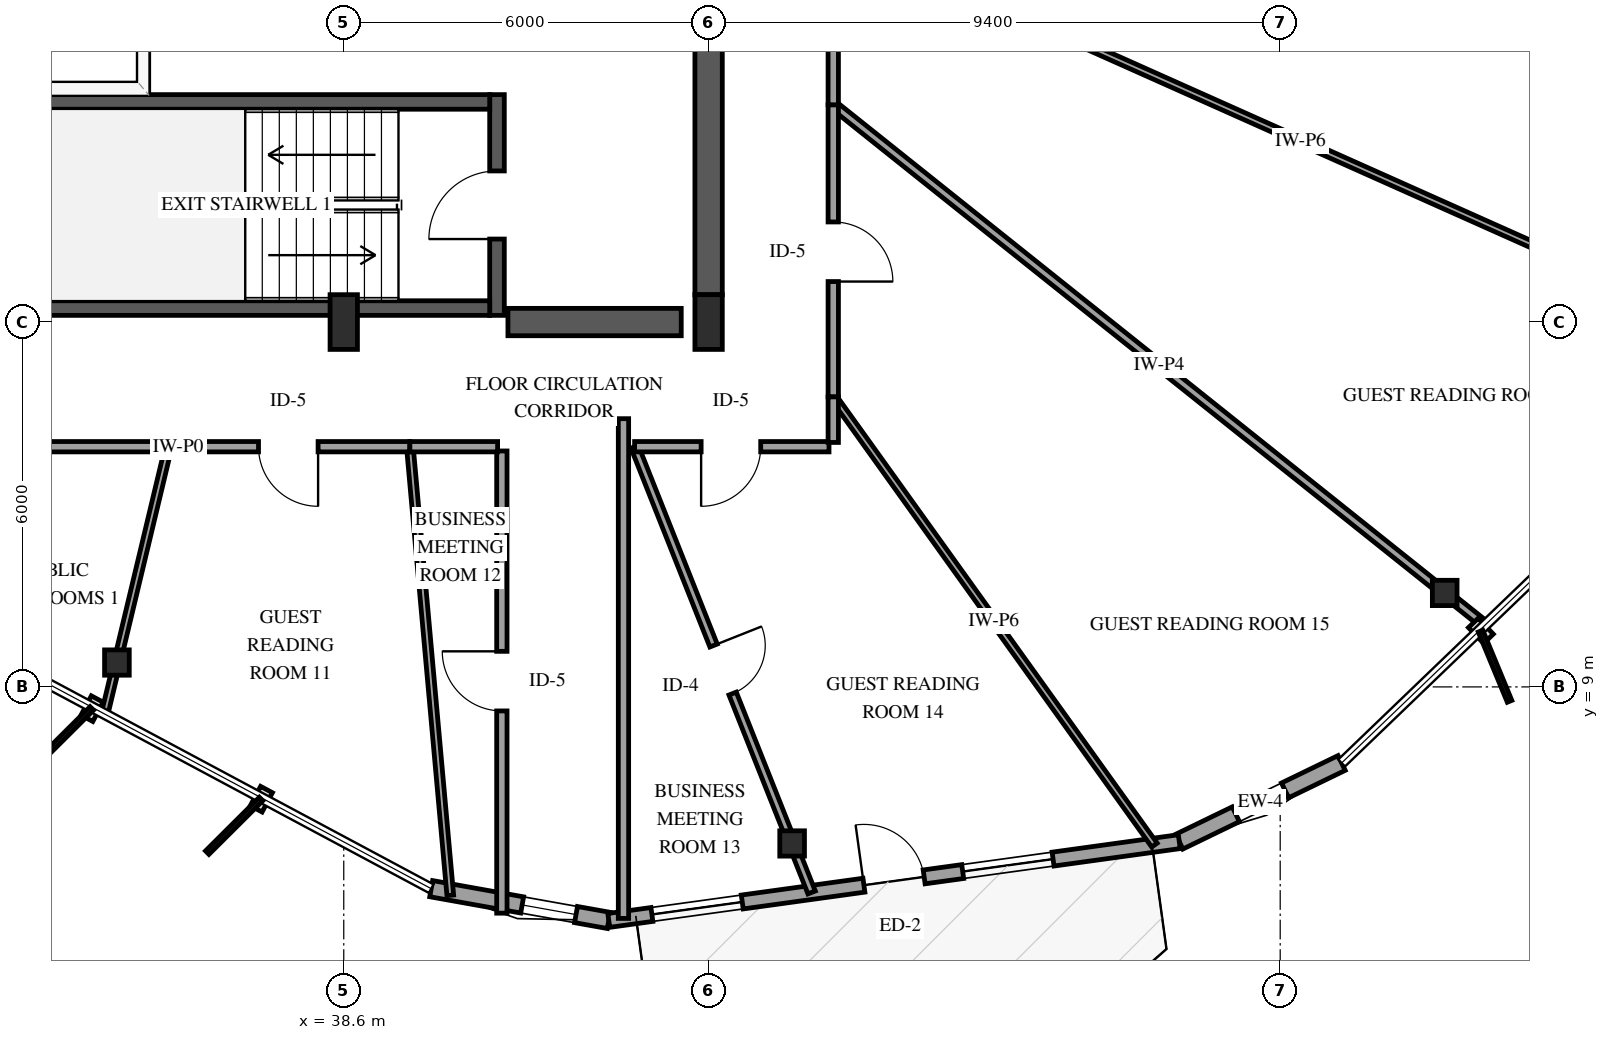
"""IFC4 building model, lengths in metres.
Left out: names, types, materials, properties, quantities, classifications, styles, units other than length and angle.
Written with IfcOpenShell. Run it as: python <this file> out.ifc"""

import sys

from ifc_helpers import new_model, si_unit, direction, frame, frame_2d, origin, origin_2d, place, context, subcontext, project, spatial, rectangle, i_section, extrude, element, fill, save


model = new_model("IFC4")
c1 = context("Model", 3, precision=1e-05, world=origin(), true_north=direction((0.0, 1.0)))
c2 = subcontext(c1, "Body", "Model", "MODEL_VIEW")
j1 = project(units=[si_unit("LENGTHUNIT", "METRE"), si_unit("PLANEANGLEUNIT", "RADIAN")], contexts=[c1])
p1 = place(None, origin())
s1 = spatial("IfcSite", under=j1, at=p1, CompositionType="ELEMENT")
p2 = place(p1, origin())
s2 = spatial("IfcBuilding", under=s1, at=p2, CompositionType="ELEMENT")
p3 = place(p2, frame((0.0, 0.0, 194.2)))
s3 = spatial("IfcBuildingStorey", under=s2, at=p3, CompositionType="ELEMENT", Elevation=194.2)
p4 = place(p3, frame((41.12, 15.11, 0.0), z_axis=(0.0, 0.0, 1.0), x_axis=(0.0, 1.0, 0.0)))
e1 = element("IfcWall", 1, at=p4, inside=s3, PredefinedType="SHEAR", context=c2, shape_type="SweptSolid", body=[
    extrude(rectangle(XDim=3.63, YDim=0.24, at=frame_2d((1.815, 0.0))), origin(), (0.0, 0.0, 1.0), 3.6),
])
p5 = place(p4, frame((1.255, 0.0, 0.0)))
e2 = element("IfcOpeningElement", 2, at=p5, cuts=e1, PredefinedType="OPENING", context=c2, shape_type="SweptSolid", body=[
    extrude(rectangle(XDim=1.12, YDim=2.15, at=frame_2d((0.56, 1.075))), frame((0.0, 0.13, 0.0), z_axis=(0.0, -1.0, 0.0), x_axis=(1.0, 0.0, 0.0)), (0.0, 0.0, 1.0), 0.26),
])
for number, where, z_axis, x_axis in (
    (3, (33.0, 15.23, 0.0), (0.0, 0.0, 1.0), (1.0, 0.0, 0.0)),
    (4, (33.0, 18.62, 0.0), (0.0, 0.0, 1.0), (1.0, 0.0, 0.0)),
):
    element("IfcWall", number, at=place(p3, frame(where, z_axis=z_axis, x_axis=x_axis)), inside=s3, PredefinedType="SHEAR", context=c2, shape_type="SweptSolid", body=[
        extrude(rectangle(XDim=8.0, YDim=0.24, at=frame_2d((4.0, 0.0))), origin(), (0.0, 0.0, 1.0), 3.6),
    ])
p6 = place(p3, frame((41.3, 15.0, 0.0), z_axis=(0.0, 0.0, 1.0), x_axis=(1.0, 0.0, 0.0)))
e5 = element("IfcWall", 5, at=p6, inside=s3, PredefinedType="SHEAR", context=c2, shape_type="SweptSolid", body=[
    extrude(rectangle(XDim=2.85, YDim=0.45, at=frame_2d((1.425, 0.0))), origin(), (0.0, 0.0, 1.0), 3.6),
])
p7 = place(p3, frame((44.6, 15.45, 0.0), z_axis=(0.0, 0.0, 1.0), x_axis=(0.0, 1.0, 0.0)))
e6 = element("IfcWall", 6, at=p7, inside=s3, PredefinedType="SHEAR", context=c2, shape_type="SweptSolid", body=[
    extrude(rectangle(XDim=6.35, YDim=0.45, at=frame_2d((3.175, 0.0))), origin(), (0.0, 0.0, 1.0), 3.6),
])
for number, where, z_axis, x_axis in (
    (7, (38.6, 15.0, 0.0), (0.0, 0.0, 1.0), (1.0, 0.0, 0.0)),
    (8, (44.6, 15.0, 0.0), (0.0, 0.0, 1.0), (1.0, 0.0, 0.0)),
):
    element("IfcColumn", number, at=place(p3, frame(where, z_axis=z_axis, x_axis=x_axis)), inside=s3, PredefinedType="PILASTER", context=c2, shape_type="SweptSolid", body=[
        extrude(rectangle(XDim=0.45, YDim=0.9, at=origin_2d()), origin(), (0.0, 0.0, 1.0), 3.6),
    ])
for number, where, z_axis, x_axis in (
    (9, (34.87, 9.401, 0.0), (0.0, 0.0, 1.0), (1.0, 0.0, 0.0)),
    (10, (45.973, 6.426, 0.0), (0.0, 0.0, 1.0), (1.0, 0.0, 0.0)),
    (11, (56.705, 10.545, 0.0), (0.0, 0.0, 1.0), (1.0, 0.0, 0.0)),
):
    element("IfcColumn", number, at=place(p3, frame(where, z_axis=z_axis, x_axis=x_axis)), inside=s3, PredefinedType="COLUMN", context=c2, shape_type="SweptSolid", body=[
        extrude(i_section(OverallWidth=0.406, OverallDepth=0.416, WebThickness=0.03, FlangeThickness=0.048, FilletRadius=0.038, at=origin_2d()), origin(), (0.0, 0.0, 1.0), 3.6),
    ])
p8 = place(p3, frame((40.038, 5.682, 0.0), z_axis=(0.0, 0.0, 1.0), x_axis=(0.984385841961, -0.176024186253, 0.0)))
e12 = element("IfcWall", 12, at=p8, inside=s3, PredefinedType="SOLIDWALL", context=c2, shape_type="SweptSolid", body=[
    extrude(rectangle(XDim=2.967, YDim=0.27, at=frame_2d((1.483, 0.0))), origin(), (0.0, 0.0, 1.0), 2.679),
])
p9 = place(p8, frame((1.519, 0.0, 0.75)))
e13 = element("IfcOpeningElement", 13, at=p9, cuts=e12, PredefinedType="OPENING", context=c2, shape_type="SweptSolid", body=[
    extrude(rectangle(XDim=0.9, YDim=1.5, at=frame_2d((0.45, 0.75))), frame((0.0, 0.145, 0.0), z_axis=(0.0, -1.0, 0.0), x_axis=(1.0, 0.0, 0.0)), (0.0, 0.0, 1.0), 0.29),
])
p10 = place(p3, frame((52.341, 6.455, 0.0), z_axis=(0.0, 0.0, 1.0), x_axis=(0.899889481121, 0.436118013578, 0.0)))
e14 = element("IfcWall", 14, at=p10, inside=s3, PredefinedType="SOLIDWALL", context=c2, shape_type="SweptSolid", body=[
    extrude(rectangle(XDim=2.966, YDim=0.27, at=frame_2d((1.483, 0.0))), origin(), (0.0, 0.0, 1.0), 2.679),
])
p11 = place(p10, frame((1.033, 0.0, 0.75)))
e15 = element("IfcOpeningElement", 15, at=p11, cuts=e14, PredefinedType="OPENING", context=c2, shape_type="SweptSolid", body=[
    extrude(rectangle(XDim=0.9, YDim=1.5, at=frame_2d((0.45, 0.75))), frame((0.0, 0.145, 0.0), z_axis=(0.0, -1.0, 0.0), x_axis=(1.0, 0.0, 0.0)), (0.0, 0.0, 1.0), 0.29),
])
p12 = place(p3, frame((42.958, 5.16, 0.0), z_axis=(0.0, 0.0, 1.0), x_axis=(0.990605602179, 0.136749921142, 0.0)))
e16 = element("IfcWall", 16, at=p12, inside=s3, PredefinedType="SOLIDWALL", context=c2, shape_type="SweptSolid", body=[
    extrude(rectangle(XDim=9.471, YDim=0.23, at=frame_2d((4.735, 0.0))), origin(), (0.0, 0.0, 1.0), 2.679),
])
p13 = place(p12, frame((4.236, 0.0, 0.0)))
e17 = element("IfcOpeningElement", 17, at=p13, cuts=e16, PredefinedType="OPENING", context=c2, shape_type="SweptSolid", body=[
    extrude(rectangle(XDim=1.0, YDim=2.15, at=frame_2d((0.5, 1.075))), frame((0.0, 0.125, 0.0), z_axis=(0.0, -1.0, 0.0), x_axis=(1.0, 0.0, 0.0)), (0.0, 0.0, 1.0), 0.25),
])
p14 = place(p12, frame((0.716, 0.0, 0.72)))
e18 = element("IfcOpeningElement", 18, at=p14, cuts=e16, PredefinedType="OPENING", context=c2, shape_type="SweptSolid", body=[
    extrude(rectangle(XDim=1.5, YDim=1.7, at=frame_2d((0.75, 0.85))), frame((0.0, 0.125, 0.0), z_axis=(0.0, -1.0, 0.0), x_axis=(1.0, 0.0, 0.0)), (0.0, 0.0, 1.0), 0.25),
])
p15 = place(p12, frame((5.875, 0.0, 0.72)))
e19 = element("IfcOpeningElement", 19, at=p15, cuts=e16, PredefinedType="OPENING", context=c2, shape_type="SweptSolid", body=[
    extrude(rectangle(XDim=1.5, YDim=1.7, at=frame_2d((0.75, 0.85))), frame((0.0, 0.125, 0.0), z_axis=(0.0, -1.0, 0.0), x_axis=(1.0, 0.0, 0.0)), (0.0, 0.0, 1.0), 0.25),
])
p16 = place(p3, frame((35.3, 18.79, 0.0), z_axis=(0.0, 0.0, 1.0), x_axis=(0.0, 1.0, 0.0)))
e20 = element("IfcWall", 20, at=p16, inside=s3, PredefinedType="SOLIDWALL", context=c2, shape_type="SweptSolid", body=[
    extrude(rectangle(XDim=2.55, YDim=0.185, at=frame_2d((1.275, 0.0))), origin(), (0.0, 0.0, 1.0), 3.3),
])
p17 = place(p16, frame((0.725, 0.0, 0.0)))
e21 = element("IfcOpeningElement", 21, at=p17, cuts=e20, PredefinedType="OPENING", context=c2, shape_type="SweptSolid", body=[
    extrude(rectangle(XDim=1.1, YDim=2.15, at=frame_2d((0.55, 1.075))), frame((0.0, 0.103, 0.0), z_axis=(0.0, -1.0, 0.0), x_axis=(1.0, 0.0, 0.0)), (0.0, 0.0, 1.0), 0.205),
])
p18 = place(p3, frame((46.65, 21.405, 0.0), z_axis=(0.0, 0.0, 1.0), x_axis=(0.913078369875, -0.407784122381, 0.0)))
e22 = element("IfcWall", 22, at=p18, inside=s3, PredefinedType="PARTITIONING", context=c2, shape_type="SweptSolid", body=[
    extrude(rectangle(XDim=16.828, YDim=0.11, at=frame_2d((8.414, 0.0))), origin(), (0.0, 0.0, 1.0), 3.3),
])
p19 = place(p3, frame((46.65, 18.573, 0.0), z_axis=(0.0, 0.0, 1.0), x_axis=(0.781519613494, -0.623880672665, 0.0)))
e23 = element("IfcWall", 23, at=p19, inside=s3, PredefinedType="PARTITIONING", context=c2, shape_type="SweptSolid", body=[
    extrude(rectangle(XDim=13.716, YDim=0.14, at=frame_2d((6.858, 0.0))), origin(), (0.0, 0.0, 1.0), 3.3),
])
p20 = place(p3, frame((46.65, 13.769, 0.0), z_axis=(0.0, 0.0, 1.0), x_axis=(0.582523685051, -0.812813727956, 0.0)))
e24 = element("IfcWall", 24, at=p20, inside=s3, PredefinedType="PARTITIONING", context=c2, shape_type="SweptSolid", body=[
    extrude(rectangle(XDim=9.067, YDim=0.11, at=frame_2d((4.534, 0.0))), origin(), (0.0, 0.0, 1.0), 2.678),
])
p21 = place(p3, frame((43.383, 12.95, 0.0), z_axis=(0.0, 0.0, 1.0), x_axis=(0.369089180525, -0.929393983636, 0.0)))
e25 = element("IfcWall", 25, at=p21, inside=s3, PredefinedType="PARTITIONING", context=c2, shape_type="SweptSolid", body=[
    extrude(rectangle(XDim=7.887, YDim=0.13, at=frame_2d((3.943, 0.0))), origin(), (0.0, 0.0, 1.0), 2.595),
])
p22 = place(p21, frame((3.518, 0.0, 0.0)))
e26 = element("IfcOpeningElement", 26, at=p22, cuts=e25, PredefinedType="OPENING", context=c2, shape_type="SweptSolid", body=[
    extrude(rectangle(XDim=0.85, YDim=2.1, at=frame_2d((0.425, 1.05))), frame((0.0, 0.075, 0.0), z_axis=(0.0, -1.0, 0.0), x_axis=(1.0, 0.0, 0.0)), (0.0, 0.0, 1.0), 0.15),
])
p23 = place(p3, frame((41.2, 5.279, 0.0), z_axis=(0.0, 0.0, 1.0), x_axis=(0.0, 1.0, 0.0)))
e27 = element("IfcWall", 27, at=p23, inside=s3, PredefinedType="PARTITIONING", context=c2, shape_type="SweptSolid", body=[
    extrude(rectangle(XDim=7.601, YDim=0.17, at=frame_2d((3.8, 0.0))), origin(), (0.0, 0.0, 1.0), 3.3),
])
p24 = place(p23, frame((3.326, 0.0, 0.0)))
e28 = element("IfcOpeningElement", 28, at=p24, cuts=e27, PredefinedType="OPENING", context=c2, shape_type="SweptSolid", body=[
    extrude(rectangle(XDim=0.98, YDim=2.15, at=frame_2d((0.49, 1.075))), frame((0.0, 0.095, 0.0), z_axis=(0.0, -1.0, 0.0), x_axis=(1.0, 0.0, 0.0)), (0.0, 0.0, 1.0), 0.19),
])
p25 = place(p3, frame((39.687, 12.95, 0.0), z_axis=(0.0, 0.0, 1.0), x_axis=(0.089786794698, -0.995961009025, 0.0)))
e29 = element("IfcWall", 29, at=p25, inside=s3, PredefinedType="PARTITIONING", context=c2, shape_type="SweptSolid", body=[
    extrude(rectangle(XDim=7.407, YDim=0.11, at=frame_2d((3.704, 0.0))), origin(), (0.0, 0.0, 1.0), 2.678),
])
p26 = place(p3, frame((35.719, 12.95, 0.0), z_axis=(0.0, 0.0, 1.0), x_axis=(-1.0, 0.0, 0.0)))
e30 = element("IfcWall", 30, at=p26, inside=s3, PredefinedType="PARTITIONING", context=c2, shape_type="SweptSolid", body=[
    extrude(rectangle(XDim=5.099, YDim=0.17, at=frame_2d((2.549, 0.0))), origin(), (0.0, 0.0, 1.0), 3.3),
])
p27 = place(p26, frame((2.075, 0.0, 0.0)))
e31 = element("IfcOpeningElement", 31, at=p27, cuts=e30, PredefinedType="OPENING", context=c2, shape_type="SweptSolid", body=[
    extrude(rectangle(XDim=0.98, YDim=2.15, at=frame_2d((0.49, 1.075))), frame((0.0, 0.095, 0.0), z_axis=(0.0, -1.0, 0.0), x_axis=(1.0, 0.0, 0.0)), (0.0, 0.0, 1.0), 0.19),
])
p28 = place(p3, frame((46.65, 18.573, 0.0), z_axis=(0.0, 0.0, 1.0), x_axis=(0.0, -1.0, 0.0)))
e32 = element("IfcWall", 32, at=p28, inside=s3, PredefinedType="PARTITIONING", context=c2, shape_type="SweptSolid", body=[
    extrude(rectangle(XDim=4.804, YDim=0.17, at=frame_2d((2.402, 0.0))), origin(), (0.0, 0.0, 1.0), 3.3),
])
p29 = place(p28, frame((1.927, 0.0, 0.0)))
e33 = element("IfcOpeningElement", 33, at=p29, cuts=e32, PredefinedType="OPENING", context=c2, shape_type="SweptSolid", body=[
    extrude(rectangle(XDim=0.98, YDim=2.15, at=frame_2d((0.49, 1.075))), frame((0.0, 0.095, 0.0), z_axis=(0.0, -1.0, 0.0), x_axis=(1.0, 0.0, 0.0)), (0.0, 0.0, 1.0), 0.19),
])
p30 = place(p3, frame((35.719, 12.95, 0.0), z_axis=(0.0, 0.0, 1.0), x_axis=(-0.232786499533, -0.972527863681, 0.0)))
e34 = element("IfcWall", 34, at=p30, inside=s3, PredefinedType="PARTITIONING", context=c2, shape_type="SweptSolid", body=[
    extrude(rectangle(XDim=4.519, YDim=0.11, at=frame_2d((2.26, 0.0))), origin(), (0.0, 0.0, 1.0), 2.595),
])
p31 = place(p3, frame((39.687, 12.95, 0.0), z_axis=(0.0, 0.0, 1.0), x_axis=(-1.0, 0.0, 0.0)))
e35 = element("IfcWall", 35, at=p31, inside=s3, PredefinedType="PARTITIONING", context=c2, shape_type="SweptSolid", body=[
    extrude(rectangle(XDim=3.968, YDim=0.17, at=frame_2d((1.984, 0.0))), origin(), (0.0, 0.0, 1.0), 3.3),
])
p32 = place(p31, frame((1.509, 0.0, 0.0)))
e36 = element("IfcOpeningElement", 36, at=p32, cuts=e35, PredefinedType="OPENING", context=c2, shape_type="SweptSolid", body=[
    extrude(rectangle(XDim=0.98, YDim=2.15, at=frame_2d((0.49, 1.075))), frame((0.0, 0.095, 0.0), z_axis=(0.0, -1.0, 0.0), x_axis=(1.0, 0.0, 0.0)), (0.0, 0.0, 1.0), 0.19),
])
p33 = place(p3, frame((46.58, 12.95, 0.0), z_axis=(0.0, 0.0, 1.0), x_axis=(-1.0, 0.0, 0.0)))
e37 = element("IfcWall", 37, at=p33, inside=s3, PredefinedType="PARTITIONING", context=c2, shape_type="SweptSolid", body=[
    extrude(rectangle(XDim=3.197, YDim=0.17, at=frame_2d((1.599, 0.0))), origin(), (0.0, 0.0, 1.0), 3.3),
])
p34 = place(p33, frame((1.123, 0.0, 0.0)))
e38 = element("IfcOpeningElement", 38, at=p34, cuts=e37, PredefinedType="OPENING", context=c2, shape_type="SweptSolid", body=[
    extrude(rectangle(XDim=0.98, YDim=2.15, at=frame_2d((0.49, 1.075))), frame((0.0, 0.095, 0.0), z_axis=(0.0, -1.0, 0.0), x_axis=(1.0, 0.0, 0.0)), (0.0, 0.0, 1.0), 0.19),
])
p35 = place(p3, frame((46.65, 21.405, 0.0), z_axis=(0.0, 0.0, 1.0), x_axis=(0.0, -1.0, 0.0)))
e39 = element("IfcWall", 39, at=p35, inside=s3, PredefinedType="PARTITIONING", context=c2, shape_type="SweptSolid", body=[
    extrude(rectangle(XDim=2.832, YDim=0.17, at=frame_2d((1.416, 0.0))), origin(), (0.0, 0.0, 1.0), 3.3),
])
p36 = place(p35, frame((0.941, 0.0, 0.0)))
e40 = element("IfcOpeningElement", 40, at=p36, cuts=e39, PredefinedType="OPENING", context=c2, shape_type="SweptSolid", body=[
    extrude(rectangle(XDim=0.98, YDim=2.15, at=frame_2d((0.49, 1.075))), frame((0.0, 0.095, 0.0), z_axis=(0.0, -1.0, 0.0), x_axis=(1.0, 0.0, 0.0)), (0.0, 0.0, 1.0), 0.19),
])
p37 = place(p3, frame((41.13, 12.95, 0.0), z_axis=(0.0, 0.0, 1.0), x_axis=(-1.0, 0.0, 0.0)))
e41 = element("IfcWall", 41, at=p37, inside=s3, PredefinedType="PARTITIONING", context=c2, shape_type="SweptSolid", body=[
    extrude(rectangle(XDim=1.443, YDim=0.17, at=frame_2d((0.721, 0.0))), origin(), (0.0, 0.0, 1.0), 3.3),
])
p38 = place(p3, frame((46.65, 13.769, 0.0), z_axis=(0.0, 0.0, 1.0), x_axis=(0.0, -1.0, 0.0)))
e42 = element("IfcWall", 42, at=p38, inside=s3, PredefinedType="PARTITIONING", context=c2, shape_type="SweptSolid", body=[
    extrude(rectangle(XDim=0.749, YDim=0.17, at=frame_2d((0.375, 0.0))), origin(), (0.0, 0.0, 1.0), 3.3),
])
p39 = place(p3, frame((43.2, 13.411, 0.0), z_axis=(0.0, 0.0, 1.0), x_axis=(0.0, -1.0, 0.0)))
e43 = element("IfcWall", 43, at=p39, inside=s3, PredefinedType="PARTITIONING", context=c2, shape_type="SweptSolid", body=[
    extrude(rectangle(XDim=8.218, YDim=0.17, at=frame_2d((4.109, 0.0))), origin(), (0.0, 0.0, 1.0), 3.3),
])
p40 = place(p9, origin())
e44 = element("IfcWindow", 44, at=p40, inside=s3, PartitioningType="SINGLE_PANEL", PredefinedType="WINDOW", context=c2, shape_type="SweptSolid", body=[
    extrude(rectangle(XDim=0.9, YDim=1.5, at=frame_2d((0.45, 0.75))), frame((0.0, 0.03, 0.0), z_axis=(0.0, -1.0, 0.0), x_axis=(1.0, 0.0, 0.0)), (0.0, 0.0, 1.0), 0.06),
])
fill(e13, e44)
p41 = place(p11, origin())
e45 = element("IfcWindow", 45, at=p41, inside=s3, PartitioningType="SINGLE_PANEL", PredefinedType="WINDOW", context=c2, shape_type="SweptSolid", body=[
    extrude(rectangle(XDim=0.9, YDim=1.5, at=frame_2d((0.45, 0.75))), frame((0.0, 0.03, 0.0), z_axis=(0.0, -1.0, 0.0), x_axis=(1.0, 0.0, 0.0)), (0.0, 0.0, 1.0), 0.06),
])
fill(e15, e45)
p42 = place(p13, origin())
e46 = element("IfcDoor", 46, at=p42, inside=s3, OperationType="SINGLE_SWING_LEFT", PredefinedType="DOOR", context=c2, shape_type="SweptSolid", body=[
    extrude(rectangle(XDim=1.0, YDim=2.15, at=frame_2d((0.5, 1.075))), frame((0.0, 0.025, 0.0), z_axis=(0.0, -1.0, 0.0), x_axis=(1.0, 0.0, 0.0)), (0.0, 0.0, 1.0), 0.05),
])
fill(e17, e46)
p43 = place(p14, origin())
e47 = element("IfcWindow", 47, at=p43, inside=s3, PartitioningType="SINGLE_PANEL", PredefinedType="WINDOW", context=c2, shape_type="SweptSolid", body=[
    extrude(rectangle(XDim=1.5, YDim=1.7, at=frame_2d((0.75, 0.85))), frame((0.0, 0.03, 0.0), z_axis=(0.0, -1.0, 0.0), x_axis=(1.0, 0.0, 0.0)), (0.0, 0.0, 1.0), 0.06),
])
fill(e18, e47)
p44 = place(p15, origin())
e48 = element("IfcWindow", 48, at=p44, inside=s3, PartitioningType="SINGLE_PANEL", PredefinedType="WINDOW", context=c2, shape_type="SweptSolid", body=[
    extrude(rectangle(XDim=1.5, YDim=1.7, at=frame_2d((0.75, 0.85))), frame((0.0, 0.03, 0.0), z_axis=(0.0, -1.0, 0.0), x_axis=(1.0, 0.0, 0.0)), (0.0, 0.0, 1.0), 0.06),
])
fill(e19, e48)
p45 = place(p5, origin())
e49 = element("IfcDoor", 49, at=p45, inside=s3, OperationType="SINGLE_SWING_LEFT", PredefinedType="DOOR", context=c2, shape_type="SweptSolid", body=[
    extrude(rectangle(XDim=1.12, YDim=2.15, at=frame_2d((0.56, 1.075))), frame((0.0, 0.025, 0.0), z_axis=(0.0, -1.0, 0.0), x_axis=(1.0, 0.0, 0.0)), (0.0, 0.0, 1.0), 0.05),
])
fill(e2, e49)
p46 = place(p22, origin())
e50 = element("IfcDoor", 50, at=p46, inside=s3, OperationType="SINGLE_SWING_LEFT", PredefinedType="DOOR", context=c2, shape_type="SweptSolid", body=[
    extrude(rectangle(XDim=0.85, YDim=2.1, at=frame_2d((0.425, 1.05))), frame((0.0, 0.025, 0.0), z_axis=(0.0, -1.0, 0.0), x_axis=(1.0, 0.0, 0.0)), (0.0, 0.0, 1.0), 0.05),
])
fill(e26, e50)
p47 = place(p24, origin())
e51 = element("IfcDoor", 51, at=p47, inside=s3, OperationType="SINGLE_SWING_RIGHT", PredefinedType="DOOR", context=c2, shape_type="SweptSolid", body=[
    extrude(rectangle(XDim=0.98, YDim=2.15, at=frame_2d((0.49, 1.075))), frame((0.0, 0.025, 0.0), z_axis=(0.0, -1.0, 0.0), x_axis=(1.0, 0.0, 0.0)), (0.0, 0.0, 1.0), 0.05),
])
fill(e28, e51)
p48 = place(p29, origin())
e52 = element("IfcDoor", 52, at=p48, inside=s3, OperationType="SINGLE_SWING_RIGHT", PredefinedType="DOOR", context=c2, shape_type="SweptSolid", body=[
    extrude(rectangle(XDim=0.98, YDim=2.15, at=frame_2d((0.49, 1.075))), frame((0.0, 0.025, 0.0), z_axis=(0.0, -1.0, 0.0), x_axis=(1.0, 0.0, 0.0)), (0.0, 0.0, 1.0), 0.05),
])
fill(e33, e52)
p49 = place(p32, origin())
e53 = element("IfcDoor", 53, at=p49, inside=s3, OperationType="SINGLE_SWING_LEFT", PredefinedType="DOOR", context=c2, shape_type="SweptSolid", body=[
    extrude(rectangle(XDim=0.98, YDim=2.15, at=frame_2d((0.49, 1.075))), frame((0.0, 0.025, 0.0), z_axis=(0.0, -1.0, 0.0), x_axis=(1.0, 0.0, 0.0)), (0.0, 0.0, 1.0), 0.05),
])
fill(e36, e53)
p50 = place(p34, origin())
e54 = element("IfcDoor", 54, at=p50, inside=s3, OperationType="SINGLE_SWING_RIGHT", PredefinedType="DOOR", context=c2, shape_type="SweptSolid", body=[
    extrude(rectangle(XDim=0.98, YDim=2.15, at=frame_2d((0.49, 1.075))), frame((0.0, 0.025, 0.0), z_axis=(0.0, -1.0, 0.0), x_axis=(1.0, 0.0, 0.0)), (0.0, 0.0, 1.0), 0.05),
])
fill(e38, e54)
save(model, sys.argv[1])
